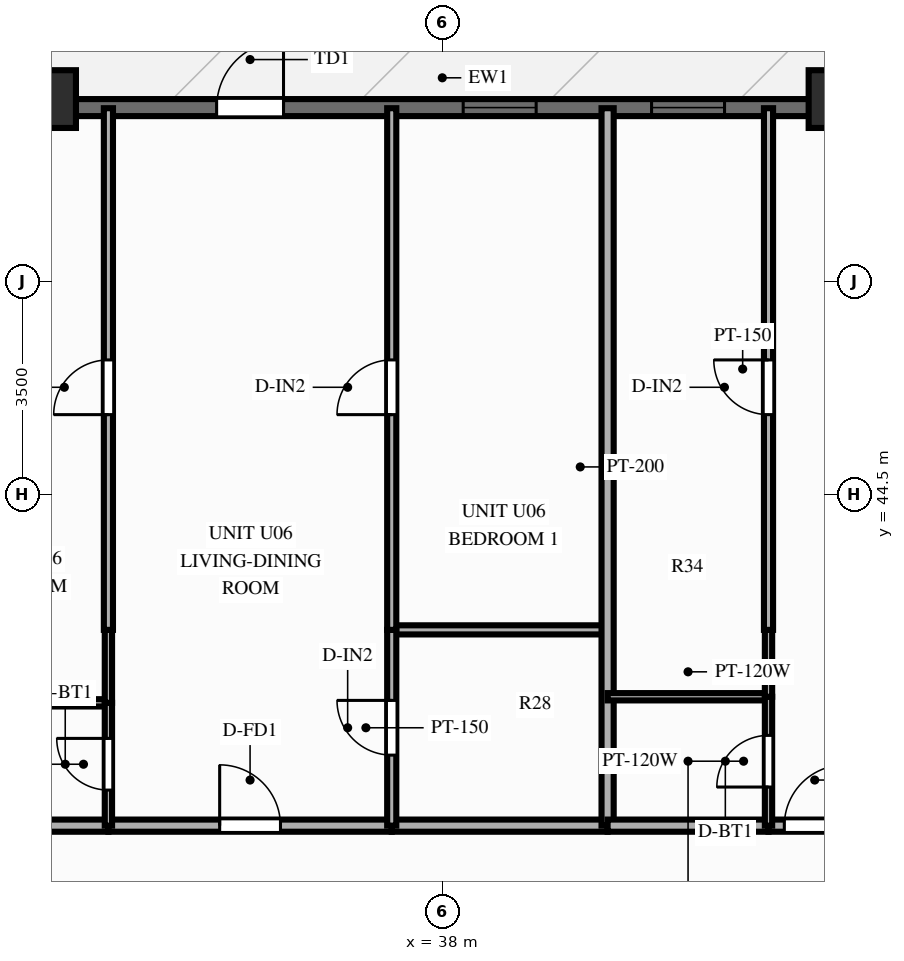
"""IFC4 building model, lengths in metres.
Left out: names, types, materials, properties, quantities, classifications, styles, units other than length and angle.
Written with IfcOpenShell. Run it as: python <this file> out.ifc"""

import sys

from ifc_helpers import new_model, si_unit, direction, frame, frame_2d, origin, origin_2d, place, context, subcontext, project, spatial, rectangle, extrude, source, transform, mapped, element, fill, save


model = new_model("IFC4")
c1 = context("Model", 3, precision=1e-05, world=origin(), true_north=direction((0.0, 1.0)))
c2 = subcontext(c1, "Body", "Model", "MODEL_VIEW")
j1 = project(units=[si_unit("LENGTHUNIT", "METRE"), si_unit("PLANEANGLEUNIT", "RADIAN")], contexts=[c1])
p1 = place(None, origin())
s1 = spatial("IfcSite", under=j1, at=p1, CompositionType="ELEMENT")
p2 = place(p1, origin())
s2 = spatial("IfcBuilding", under=s1, at=p2, CompositionType="ELEMENT")
p3 = place(p2, frame((0.0, 0.0, 86.85)))
s3 = spatial("IfcBuildingStorey", under=s2, at=p3, CompositionType="ELEMENT", Elevation=86.85)
m1 = source(origin(), c2, "Body", "SweptSolid", [
    extrude(rectangle(XDim=0.95, YDim=0.95, at=origin_2d()), origin(), (0.0, 0.0, 1.0), 3.0),
])
for number, where, z_axis, x_axis in (
    (1, (44.5, 51.0, 0.0), (0.0, 0.0, 1.0), (1.0, 0.0, 0.0)),
    (2, (31.5, 51.0, 0.0), (0.0, 0.0, 1.0), (1.0, 0.0, 0.0)),
):
    element("IfcColumn", number, at=place(p3, frame(where, z_axis=z_axis, x_axis=x_axis)), inside=s3, PredefinedType="COLUMN", context=c2, shape_type="MappedRepresentation", body=[
        mapped(m1, transform((0.0, 0.0, 0.0), scale=1.0)),
    ])
p4 = place(p3, frame((16.2, 50.86, 0.0), z_axis=(0.0, 0.0, 1.0), x_axis=(1.0, 0.0, 0.0)))
e3 = element("IfcWall", 3, at=p4, inside=s3, PredefinedType="SOLIDWALL", context=c2, shape_type="SweptSolid", body=[
    extrude(rectangle(XDim=43.6, YDim=0.28, at=frame_2d((21.8, 0.0))), origin(), (0.0, 0.0, 1.0), 2.28),
])
p5 = place(p4, frame((0.722, 0.0, 0.25)))
e4 = element("IfcOpeningElement", 4, at=p5, cuts=e3, PredefinedType="OPENING", context=c2, shape_type="SweptSolid", body=[
    extrude(rectangle(XDim=1.2, YDim=1.5, at=frame_2d((0.6, 0.75))), frame((0.0, 0.152, 0.0), z_axis=(0.0, -1.0, 0.0), x_axis=(1.0, 0.0, 0.0)), (0.0, 0.0, 1.0), 0.304),
])
p6 = place(p4, frame((3.172, 0.0, 0.25)))
e5 = element("IfcOpeningElement", 5, at=p6, cuts=e3, PredefinedType="OPENING", context=c2, shape_type="SweptSolid", body=[
    extrude(rectangle(XDim=1.2, YDim=1.5, at=frame_2d((0.6, 0.75))), frame((0.0, 0.152, 0.0), z_axis=(0.0, -1.0, 0.0), x_axis=(1.0, 0.0, 0.0)), (0.0, 0.0, 1.0), 0.304),
])
p7 = place(p4, frame((6.944, 0.0, 0.25)))
e6 = element("IfcOpeningElement", 6, at=p7, cuts=e3, PredefinedType="OPENING", context=c2, shape_type="SweptSolid", body=[
    extrude(rectangle(XDim=1.2, YDim=1.5, at=frame_2d((0.6, 0.75))), frame((0.0, 0.152, 0.0), z_axis=(0.0, -1.0, 0.0), x_axis=(1.0, 0.0, 0.0)), (0.0, 0.0, 1.0), 0.304),
])
p8 = place(p4, frame((11.049, 0.0, 0.25)))
e7 = element("IfcOpeningElement", 7, at=p8, cuts=e3, PredefinedType="OPENING", context=c2, shape_type="SweptSolid", body=[
    extrude(rectangle(XDim=1.2, YDim=1.5, at=frame_2d((0.6, 0.75))), frame((0.0, 0.152, 0.0), z_axis=(0.0, -1.0, 0.0), x_axis=(1.0, 0.0, 0.0)), (0.0, 0.0, 1.0), 0.304),
])
p9 = place(p4, frame((13.73, 0.0, 0.25)))
e8 = element("IfcOpeningElement", 8, at=p9, cuts=e3, PredefinedType="OPENING", context=c2, shape_type="SweptSolid", body=[
    extrude(rectangle(XDim=0.95, YDim=1.5, at=frame_2d((0.475, 0.75))), frame((0.0, 0.152, 0.0), z_axis=(0.0, -1.0, 0.0), x_axis=(1.0, 0.0, 0.0)), (0.0, 0.0, 1.0), 0.304),
])
p10 = place(p4, frame((18.089, 0.0, 0.0)))
e9 = element("IfcOpeningElement", 9, at=p10, cuts=e3, PredefinedType="OPENING", context=c2, shape_type="SweptSolid", body=[
    extrude(rectangle(XDim=1.1, YDim=2.15, at=frame_2d((0.55, 1.075))), frame((0.0, 0.152, 0.0), z_axis=(0.0, -1.0, 0.0), x_axis=(1.0, 0.0, 0.0)), (0.0, 0.0, 1.0), 0.304),
])
p11 = place(p4, frame((22.144, 0.0, 0.25)))
e10 = element("IfcOpeningElement", 10, at=p11, cuts=e3, PredefinedType="OPENING", context=c2, shape_type="SweptSolid", body=[
    extrude(rectangle(XDim=1.2, YDim=1.5, at=frame_2d((0.6, 0.75))), frame((0.0, 0.152, 0.0), z_axis=(0.0, -1.0, 0.0), x_axis=(1.0, 0.0, 0.0)), (0.0, 0.0, 1.0), 0.304),
])
p12 = place(p4, frame((25.242, 0.0, 0.25)))
e11 = element("IfcOpeningElement", 11, at=p12, cuts=e3, PredefinedType="OPENING", context=c2, shape_type="SweptSolid", body=[
    extrude(rectangle(XDim=1.2, YDim=1.5, at=frame_2d((0.6, 0.75))), frame((0.0, 0.152, 0.0), z_axis=(0.0, -1.0, 0.0), x_axis=(1.0, 0.0, 0.0)), (0.0, 0.0, 1.0), 0.304),
])
p13 = place(p4, frame((29.021, 0.0, 0.25)))
e12 = element("IfcOpeningElement", 12, at=p13, cuts=e3, PredefinedType="OPENING", context=c2, shape_type="SweptSolid", body=[
    extrude(rectangle(XDim=0.95, YDim=1.5, at=frame_2d((0.475, 0.75))), frame((0.0, 0.152, 0.0), z_axis=(0.0, -1.0, 0.0), x_axis=(1.0, 0.0, 0.0)), (0.0, 0.0, 1.0), 0.304),
])
p14 = place(p4, frame((31.574, 0.0, 0.25)))
e13 = element("IfcOpeningElement", 13, at=p14, cuts=e3, PredefinedType="OPENING", context=c2, shape_type="SweptSolid", body=[
    extrude(rectangle(XDim=1.2, YDim=1.5, at=frame_2d((0.6, 0.75))), frame((0.0, 0.152, 0.0), z_axis=(0.0, -1.0, 0.0), x_axis=(1.0, 0.0, 0.0)), (0.0, 0.0, 1.0), 0.304),
])
p15 = place(p4, frame((34.692, 0.0, 0.25)))
e14 = element("IfcOpeningElement", 14, at=p15, cuts=e3, PredefinedType="OPENING", context=c2, shape_type="SweptSolid", body=[
    extrude(rectangle(XDim=1.2, YDim=1.5, at=frame_2d((0.6, 0.75))), frame((0.0, 0.152, 0.0), z_axis=(0.0, -1.0, 0.0), x_axis=(1.0, 0.0, 0.0)), (0.0, 0.0, 1.0), 0.304),
])
p16 = place(p4, frame((37.622, 0.0, 0.25)))
e15 = element("IfcOpeningElement", 15, at=p16, cuts=e3, PredefinedType="OPENING", context=c2, shape_type="SweptSolid", body=[
    extrude(rectangle(XDim=1.2, YDim=1.5, at=frame_2d((0.6, 0.75))), frame((0.0, 0.152, 0.0), z_axis=(0.0, -1.0, 0.0), x_axis=(1.0, 0.0, 0.0)), (0.0, 0.0, 1.0), 0.304),
])
p17 = place(p4, frame((40.957, 0.0, 0.25)))
e16 = element("IfcOpeningElement", 16, at=p17, cuts=e3, PredefinedType="OPENING", context=c2, shape_type="SweptSolid", body=[
    extrude(rectangle(XDim=1.2, YDim=1.5, at=frame_2d((0.6, 0.75))), frame((0.0, 0.152, 0.0), z_axis=(0.0, -1.0, 0.0), x_axis=(1.0, 0.0, 0.0)), (0.0, 0.0, 1.0), 0.304),
])
p18 = place(p3, frame((29.624, 39.05, 0.0), z_axis=(0.0, 0.0, 1.0), x_axis=(1.0, 0.0, 0.0)))
e17 = element("IfcWall", 17, at=p18, inside=s3, PredefinedType="PARTITIONING", context=c2, shape_type="SweptSolid", body=[
    extrude(rectangle(XDim=2.885, YDim=0.2, at=frame_2d((1.442, 0.0))), origin(), (0.0, 0.0, 1.0), 2.79),
])
p19 = place(p3, frame((32.509, 39.05, 0.0), z_axis=(0.0, 0.0, 1.0), x_axis=(1.0, 0.0, 0.0)))
e18 = element("IfcWall", 18, at=p19, inside=s3, PredefinedType="PARTITIONING", context=c2, shape_type="SweptSolid", body=[
    extrude(rectangle(XDim=4.66, YDim=0.2, at=frame_2d((2.33, 0.0))), origin(), (0.0, 0.0, 1.0), 2.79),
])
p20 = place(p19, frame((1.83, 0.0, 0.0)))
e19 = element("IfcOpeningElement", 19, at=p20, cuts=e18, PredefinedType="OPENING", context=c2, shape_type="SweptSolid", body=[
    extrude(rectangle(XDim=1.0, YDim=2.15, at=frame_2d((0.5, 1.075))), frame((0.0, 0.112, 0.0), z_axis=(0.0, -1.0, 0.0), x_axis=(1.0, 0.0, 0.0)), (0.0, 0.0, 1.0), 0.224),
])
p21 = place(p3, frame((37.168, 39.05, 0.0), z_axis=(0.0, 0.0, 1.0), x_axis=(1.0, 0.0, 0.0)))
e20 = element("IfcWall", 20, at=p21, inside=s3, PredefinedType="PARTITIONING", context=c2, shape_type="SweptSolid", body=[
    extrude(rectangle(XDim=3.55, YDim=0.2, at=frame_2d((1.775, 0.0))), origin(), (0.0, 0.0, 1.0), 2.79),
])
p22 = place(p3, frame((29.624, 41.07, 0.0), z_axis=(0.0, 0.0, 1.0), x_axis=(1.0, 0.0, 0.0)))
e21 = element("IfcWall", 21, at=p22, inside=s3, PredefinedType="PARTITIONING", context=c2, shape_type="SweptSolid", body=[
    extrude(rectangle(XDim=2.885, YDim=0.12, at=frame_2d((1.442, 0.0))), origin(), (0.0, 0.0, 1.0), 2.79),
])
p23 = place(p3, frame((37.168, 42.27, 0.0), z_axis=(0.0, 0.0, 1.0), x_axis=(1.0, 0.0, 0.0)))
e22 = element("IfcWall", 22, at=p23, inside=s3, PredefinedType="PARTITIONING", context=c2, shape_type="SweptSolid", body=[
    extrude(rectangle(XDim=3.55, YDim=0.15, at=frame_2d((1.775, 0.0))), origin(), (0.0, 0.0, 1.0), 2.79),
])
p24 = place(p3, frame((32.509, 39.05, 0.0), z_axis=(0.0, 0.0, 1.0), x_axis=(0.0, 1.0, 0.0)))
e23 = element("IfcWall", 23, at=p24, inside=s3, PredefinedType="PARTITIONING", context=c2, shape_type="SweptSolid", body=[
    extrude(rectangle(XDim=2.02, YDim=0.12, at=frame_2d((1.01, 0.0))), origin(), (0.0, 0.0, 1.0), 2.79),
])
p25 = place(p24, frame((0.585, 0.0, 0.0)))
e24 = element("IfcOpeningElement", 24, at=p25, cuts=e23, PredefinedType="OPENING", context=c2, shape_type="SweptSolid", body=[
    extrude(rectangle(XDim=0.85, YDim=2.05, at=frame_2d((0.425, 1.025))), frame((0.0, 0.072, 0.0), z_axis=(0.0, -1.0, 0.0), x_axis=(1.0, 0.0, 0.0)), (0.0, 0.0, 1.0), 0.144),
])
p26 = place(p3, frame((32.509, 41.07, 0.0), z_axis=(0.0, 0.0, 1.0), x_axis=(0.0, 1.0, 0.0)))
e25 = element("IfcWall", 25, at=p26, inside=s3, PredefinedType="PARTITIONING", context=c2, shape_type="SweptSolid", body=[
    extrude(rectangle(XDim=1.2, YDim=0.12, at=frame_2d((0.6, 0.0))), origin(), (0.0, 0.0, 1.0), 2.79),
])
p27 = place(p3, frame((32.509, 42.27, 0.0), z_axis=(0.0, 0.0, 1.0), x_axis=(0.0, 1.0, 0.0)))
e26 = element("IfcWall", 26, at=p27, inside=s3, PredefinedType="PARTITIONING", context=c2, shape_type="SweptSolid", body=[
    extrude(rectangle(XDim=8.58, YDim=0.15, at=frame_2d((4.29, 0.0))), origin(), (0.0, 0.0, 1.0), 2.79),
])
p28 = place(p27, frame((3.54, 0.0, 0.0)))
e27 = element("IfcOpeningElement", 27, at=p28, cuts=e26, PredefinedType="OPENING", context=c2, shape_type="SweptSolid", body=[
    extrude(rectangle(XDim=0.9, YDim=2.1, at=frame_2d((0.45, 1.05))), frame((0.0, 0.087, 0.0), z_axis=(0.0, -1.0, 0.0), x_axis=(1.0, 0.0, 0.0)), (0.0, 0.0, 1.0), 0.174),
])
p29 = place(p3, frame((37.168, 39.05, 0.0), z_axis=(0.0, 0.0, 1.0), x_axis=(0.0, 1.0, 0.0)))
e28 = element("IfcWall", 28, at=p29, inside=s3, PredefinedType="PARTITIONING", context=c2, shape_type="SweptSolid", body=[
    extrude(rectangle(XDim=3.22, YDim=0.15, at=frame_2d((1.61, 0.0))), origin(), (0.0, 0.0, 1.0), 2.79),
])
p30 = place(p29, frame((1.16, 0.0, 0.0)))
e29 = element("IfcOpeningElement", 29, at=p30, cuts=e28, PredefinedType="OPENING", context=c2, shape_type="SweptSolid", body=[
    extrude(rectangle(XDim=0.9, YDim=2.1, at=frame_2d((0.45, 1.05))), frame((0.0, 0.087, 0.0), z_axis=(0.0, -1.0, 0.0), x_axis=(1.0, 0.0, 0.0)), (0.0, 0.0, 1.0), 0.174),
])
p31 = place(p3, frame((37.168, 42.27, 0.0), z_axis=(0.0, 0.0, 1.0), x_axis=(0.0, 1.0, 0.0)))
e30 = element("IfcWall", 30, at=p31, inside=s3, PredefinedType="PARTITIONING", context=c2, shape_type="SweptSolid", body=[
    extrude(rectangle(XDim=8.58, YDim=0.15, at=frame_2d((4.29, 0.0))), origin(), (0.0, 0.0, 1.0), 2.79),
])
p32 = place(p31, frame((3.54, 0.0, 0.0)))
e31 = element("IfcOpeningElement", 31, at=p32, cuts=e30, PredefinedType="OPENING", context=c2, shape_type="SweptSolid", body=[
    extrude(rectangle(XDim=0.9, YDim=2.1, at=frame_2d((0.45, 1.05))), frame((0.0, 0.087, 0.0), z_axis=(0.0, -1.0, 0.0), x_axis=(1.0, 0.0, 0.0)), (0.0, 0.0, 1.0), 0.174),
])
p33 = place(p3, frame((40.719, 39.05, 0.0), z_axis=(0.0, 0.0, 1.0), x_axis=(0.0, 1.0, 0.0)))
e32 = element("IfcWall", 32, at=p33, inside=s3, PredefinedType="PARTITIONING", context=c2, shape_type="SweptSolid", body=[
    extrude(rectangle(XDim=11.8, YDim=0.2, at=frame_2d((5.9, 0.0))), origin(), (0.0, 0.0, 1.0), 2.79),
])
p34 = place(p3, frame((40.719, 39.05, 0.0), z_axis=(0.0, 0.0, 1.0), x_axis=(1.0, 0.0, 0.0)))
e33 = element("IfcWall", 33, at=p34, inside=s3, PredefinedType="PARTITIONING", context=c2, shape_type="SweptSolid", body=[
    extrude(rectangle(XDim=2.646, YDim=0.2, at=frame_2d((1.323, 0.0))), origin(), (0.0, 0.0, 1.0), 2.79),
])
p35 = place(p3, frame((43.365, 39.05, 0.0), z_axis=(0.0, 0.0, 1.0), x_axis=(1.0, 0.0, 0.0)))
e34 = element("IfcWall", 34, at=p35, inside=s3, PredefinedType="PARTITIONING", context=c2, shape_type="SweptSolid", body=[
    extrude(rectangle(XDim=3.213, YDim=0.2, at=frame_2d((1.606, 0.0))), origin(), (0.0, 0.0, 1.0), 2.79),
])
p36 = place(p35, frame((0.26, 0.0, 0.0)))
e35 = element("IfcOpeningElement", 35, at=p36, cuts=e34, PredefinedType="OPENING", context=c2, shape_type="SweptSolid", body=[
    extrude(rectangle(XDim=1.0, YDim=2.15, at=frame_2d((0.5, 1.075))), frame((0.0, 0.112, 0.0), z_axis=(0.0, -1.0, 0.0), x_axis=(1.0, 0.0, 0.0)), (0.0, 0.0, 1.0), 0.224),
])
p37 = place(p3, frame((40.719, 41.17, 0.0), z_axis=(0.0, 0.0, 1.0), x_axis=(1.0, 0.0, 0.0)))
e36 = element("IfcWall", 36, at=p37, inside=s3, PredefinedType="PARTITIONING", context=c2, shape_type="SweptSolid", body=[
    extrude(rectangle(XDim=2.646, YDim=0.12, at=frame_2d((1.323, 0.0))), origin(), (0.0, 0.0, 1.0), 2.79),
])
p38 = place(p3, frame((43.365, 39.05, 0.0), z_axis=(0.0, 0.0, 1.0), x_axis=(0.0, 1.0, 0.0)))
e37 = element("IfcWall", 37, at=p38, inside=s3, PredefinedType="PARTITIONING", context=c2, shape_type="SweptSolid", body=[
    extrude(rectangle(XDim=2.12, YDim=0.12, at=frame_2d((1.06, 0.0))), origin(), (0.0, 0.0, 1.0), 2.79),
])
p39 = place(p38, frame((0.635, 0.0, 0.0)))
e38 = element("IfcOpeningElement", 38, at=p39, cuts=e37, PredefinedType="OPENING", context=c2, shape_type="SweptSolid", body=[
    extrude(rectangle(XDim=0.85, YDim=2.05, at=frame_2d((0.425, 1.025))), frame((0.0, 0.072, 0.0), z_axis=(0.0, -1.0, 0.0), x_axis=(1.0, 0.0, 0.0)), (0.0, 0.0, 1.0), 0.144),
])
p40 = place(p3, frame((43.365, 41.17, 0.0), z_axis=(0.0, 0.0, 1.0), x_axis=(0.0, 1.0, 0.0)))
e39 = element("IfcWall", 39, at=p40, inside=s3, PredefinedType="PARTITIONING", context=c2, shape_type="SweptSolid", body=[
    extrude(rectangle(XDim=1.1, YDim=0.12, at=frame_2d((0.55, 0.0))), origin(), (0.0, 0.0, 1.0), 2.79),
])
p41 = place(p3, frame((43.365, 42.27, 0.0), z_axis=(0.0, 0.0, 1.0), x_axis=(0.0, 1.0, 0.0)))
e40 = element("IfcWall", 40, at=p41, inside=s3, PredefinedType="PARTITIONING", context=c2, shape_type="SweptSolid", body=[
    extrude(rectangle(XDim=8.58, YDim=0.15, at=frame_2d((4.29, 0.0))), origin(), (0.0, 0.0, 1.0), 2.79),
])
p42 = place(p41, frame((3.54, 0.0, 0.0)))
e41 = element("IfcOpeningElement", 41, at=p42, cuts=e40, PredefinedType="OPENING", context=c2, shape_type="SweptSolid", body=[
    extrude(rectangle(XDim=0.9, YDim=2.1, at=frame_2d((0.45, 1.05))), frame((0.0, 0.087, 0.0), z_axis=(0.0, -1.0, 0.0), x_axis=(1.0, 0.0, 0.0)), (0.0, 0.0, 1.0), 0.174),
])
m2 = source(origin(), c2, "Body", "SweptSolid", [
    extrude(rectangle(XDim=1.1, YDim=2.15, at=frame_2d((0.55, 1.075))), frame((0.0, 0.025, 0.0), z_axis=(0.0, -1.0, 0.0), x_axis=(1.0, 0.0, 0.0)), (0.0, 0.0, 1.0), 0.05),
])
p43 = place(p10, origin())
e42 = element("IfcDoor", 42, at=p43, inside=s3, OperationType="SINGLE_SWING_RIGHT", PredefinedType="DOOR", context=c2, shape_type="MappedRepresentation", body=[
    mapped(m2, transform((0.0, 0.0, 0.0), scale=1.0)),
])
fill(e9, e42)
m3 = source(origin(), c2, "Body", "SweptSolid", [
    extrude(rectangle(XDim=1.2, YDim=1.5, at=frame_2d((0.6, 0.75))), frame((0.0, 0.03, 0.0), z_axis=(0.0, -1.0, 0.0), x_axis=(1.0, 0.0, 0.0)), (0.0, 0.0, 1.0), 0.06),
])
p44 = place(p11, origin())
e43 = element("IfcWindow", 43, at=p44, inside=s3, PartitioningType="SINGLE_PANEL", PredefinedType="WINDOW", context=c2, shape_type="MappedRepresentation", body=[
    mapped(m3, transform((0.0, 0.0, 0.0), scale=1.0)),
])
fill(e10, e43)
p45 = place(p12, origin())
e44 = element("IfcWindow", 44, at=p45, inside=s3, PartitioningType="SINGLE_PANEL", PredefinedType="WINDOW", context=c2, shape_type="MappedRepresentation", body=[
    mapped(m3, transform((0.0, 0.0, 0.0), scale=1.0)),
])
fill(e11, e44)
m4 = source(origin(), c2, "Body", "SweptSolid", [
    extrude(rectangle(XDim=1.0, YDim=2.15, at=frame_2d((0.5, 1.075))), frame((0.0, 0.025, 0.0), z_axis=(0.0, -1.0, 0.0), x_axis=(1.0, 0.0, 0.0)), (0.0, 0.0, 1.0), 0.05),
])
p46 = place(p20, origin())
e45 = element("IfcDoor", 45, at=p46, inside=s3, OperationType="SINGLE_SWING_LEFT", PredefinedType="DOOR", context=c2, shape_type="MappedRepresentation", body=[
    mapped(m4, transform((0.0, 0.0, 0.0), scale=1.0)),
])
fill(e19, e45)
m5 = source(origin(), c2, "Body", "SweptSolid", [
    extrude(rectangle(XDim=0.85, YDim=2.05, at=frame_2d((0.425, 1.025))), frame((0.0, 0.025, 0.0), z_axis=(0.0, -1.0, 0.0), x_axis=(1.0, 0.0, 0.0)), (0.0, 0.0, 1.0), 0.05),
])
p47 = place(p25, origin())
e46 = element("IfcDoor", 46, at=p47, inside=s3, OperationType="SINGLE_SWING_RIGHT", PredefinedType="DOOR", context=c2, shape_type="MappedRepresentation", body=[
    mapped(m5, transform((0.0, 0.0, 0.0), scale=1.0)),
])
fill(e24, e46)
m6 = source(origin(), c2, "Body", "SweptSolid", [
    extrude(rectangle(XDim=0.9, YDim=2.1, at=frame_2d((0.45, 1.05))), frame((0.0, 0.025, 0.0), z_axis=(0.0, -1.0, 0.0), x_axis=(1.0, 0.0, 0.0)), (0.0, 0.0, 1.0), 0.05),
])
p48 = place(p28, origin())
e47 = element("IfcDoor", 47, at=p48, inside=s3, OperationType="SINGLE_SWING_LEFT", PredefinedType="DOOR", context=c2, shape_type="MappedRepresentation", body=[
    mapped(m6, transform((0.0, 0.0, 0.0), scale=1.0)),
])
fill(e27, e47)
p49 = place(p30, origin())
e48 = element("IfcDoor", 48, at=p49, inside=s3, OperationType="SINGLE_SWING_RIGHT", PredefinedType="DOOR", context=c2, shape_type="MappedRepresentation", body=[
    mapped(m6, transform((0.0, 0.0, 0.0), scale=1.0)),
])
fill(e29, e48)
p50 = place(p32, origin())
e49 = element("IfcDoor", 49, at=p50, inside=s3, OperationType="SINGLE_SWING_LEFT", PredefinedType="DOOR", context=c2, shape_type="MappedRepresentation", body=[
    mapped(m6, transform((0.0, 0.0, 0.0), scale=1.0)),
])
fill(e31, e49)
p51 = place(p36, origin())
e50 = element("IfcDoor", 50, at=p51, inside=s3, OperationType="SINGLE_SWING_RIGHT", PredefinedType="DOOR", context=c2, shape_type="MappedRepresentation", body=[
    mapped(m4, transform((0.0, 0.0, 0.0), scale=1.0)),
])
fill(e35, e50)
p52 = place(p39, origin())
e51 = element("IfcDoor", 51, at=p52, inside=s3, OperationType="SINGLE_SWING_LEFT", PredefinedType="DOOR", context=c2, shape_type="MappedRepresentation", body=[
    mapped(m5, transform((0.0, 0.0, 0.0), scale=1.0)),
])
fill(e38, e51)
p53 = place(p42, origin())
e52 = element("IfcDoor", 52, at=p53, inside=s3, OperationType="SINGLE_SWING_RIGHT", PredefinedType="DOOR", context=c2, shape_type="MappedRepresentation", body=[
    mapped(m6, transform((0.0, 0.0, 0.0), scale=1.0)),
])
fill(e41, e52)
save(model, sys.argv[1])
